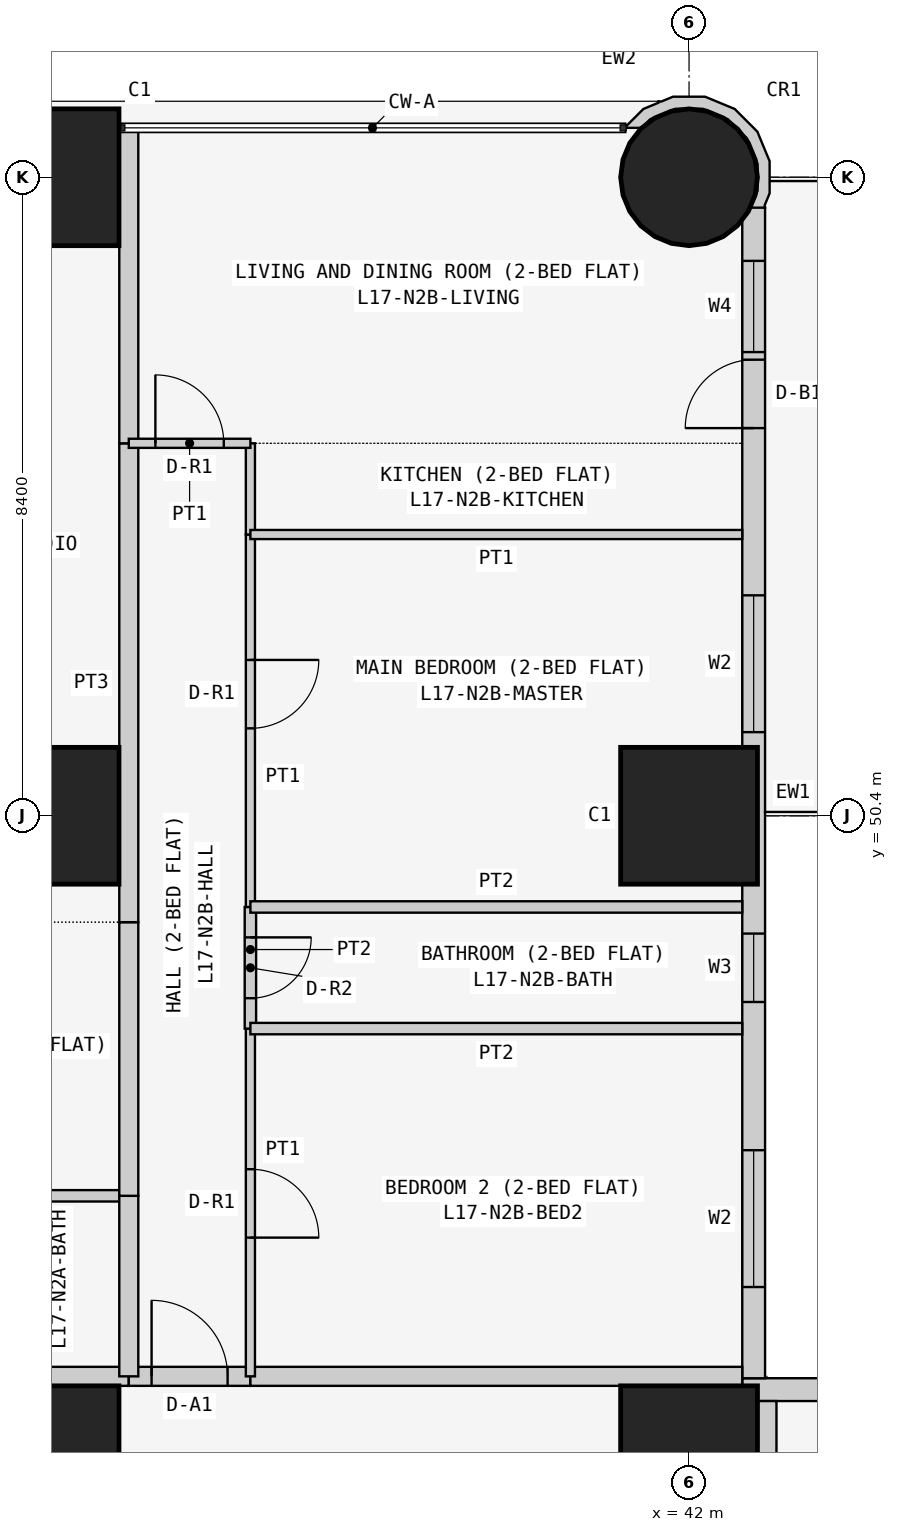
"""IFC4 building model, lengths in metres.
Left out: names, types, materials, properties, quantities, classifications, styles, units other than length and angle.
Written with IfcOpenShell. Run it as: python <this file> out.ifc"""

import sys

from ifc_helpers import new_model, si_unit, direction, frame, frame_2d, origin, origin_2d, place, context, subcontext, project, spatial, polyline, rectangle, circle, outline, extrude, element, fill, save


model = new_model("IFC4")
c1 = context("Model", 3, precision=1e-05, world=origin(), true_north=direction((0.0, 1.0)))
c2 = subcontext(c1, "Body", "Model", "MODEL_VIEW")
j1 = project(units=[si_unit("LENGTHUNIT", "METRE"), si_unit("PLANEANGLEUNIT", "RADIAN")], contexts=[c1])
p1 = place(None, origin())
s1 = spatial("IfcSite", under=j1, at=p1, CompositionType="ELEMENT")
p2 = place(p1, origin())
s2 = spatial("IfcBuilding", under=s1, at=p2, CompositionType="ELEMENT")
p3 = place(p2, frame((0.0, 0.0, 70.5)))
s3 = spatial("IfcBuildingStorey", under=s2, at=p3, CompositionType="ELEMENT", Elevation=70.5)
for number, where, z_axis, x_axis in (
    (1, (33.6, 42.0, 0.0), (0.0, 0.0, 1.0), (1.0, 0.0, 0.0)),
    (2, (33.6, 50.4, 0.0), (0.0, 0.0, 1.0), (1.0, 0.0, 0.0)),
    (3, (33.6, 58.8, 0.0), (0.0, 0.0, 1.0), (1.0, 0.0, 0.0)),
    (4, (42.0, 42.0, 0.0), (0.0, 0.0, 1.0), (1.0, 0.0, 0.0)),
    (5, (42.0, 50.4, 0.0), (0.0, 0.0, 1.0), (1.0, 0.0, 0.0)),
):
    element("IfcColumn", number, at=place(p3, frame(where, z_axis=z_axis, x_axis=x_axis)), inside=s3, PredefinedType="COLUMN", context=c2, shape_type="SweptSolid", body=[
        extrude(rectangle(XDim=1.8, YDim=1.8, at=origin_2d()), origin(), (0.0, 0.0, 1.0), 3.6),
    ])
p4 = place(p3, frame((42.0, 58.8, 0.0), z_axis=(0.0, 0.0, 1.0), x_axis=(1.0, 0.0, 0.0)))
e6 = element("IfcColumn", 6, at=p4, inside=s3, PredefinedType="COLUMN", context=c2, shape_type="SweptSolid", body=[
    extrude(circle(Radius=0.9, at=origin_2d()), origin(), (0.0, 0.0, 1.0), 3.6),
])
p5 = place(p3, frame((58.4, 42.85, 0.0), z_axis=(0.0, 0.0, 1.0), x_axis=(-1.0, 0.0, 0.0)))
e7 = element("IfcWall", 7, at=p5, inside=s3, PredefinedType="SOLIDWALL", context=c2, shape_type="SweptSolid", body=[
    extrude(rectangle(XDim=15.7, YDim=0.3, at=frame_2d((7.85, 0.0))), origin(), (0.0, 0.0, 1.0), 3.45),
])
p6 = place(p5, frame((12.4, 0.0, 0.9)))
e8 = element("IfcOpeningElement", 8, at=p6, cuts=e7, PredefinedType="OPENING", context=c2, shape_type="SweptSolid", body=[
    extrude(rectangle(XDim=1.8, YDim=1.5, at=frame_2d((0.9, 0.75))), frame((0.0, 0.16, 0.0), z_axis=(0.0, -1.0, 0.0), x_axis=(1.0, 0.0, 0.0)), (0.0, 0.0, 1.0), 0.32),
])
p7 = place(p5, frame((9.55, 0.0, 1.5)))
e9 = element("IfcOpeningElement", 9, at=p7, cuts=e7, PredefinedType="OPENING", context=c2, shape_type="SweptSolid", body=[
    extrude(rectangle(XDim=0.9, YDim=0.7, at=frame_2d((0.45, 0.35))), frame((0.0, 0.16, 0.0), z_axis=(0.0, -1.0, 0.0), x_axis=(1.0, 0.0, 0.0)), (0.0, 0.0, 1.0), 0.32),
])
p8 = place(p5, frame((5.1, 0.0, 0.9)))
e10 = element("IfcOpeningElement", 10, at=p8, cuts=e7, PredefinedType="OPENING", context=c2, shape_type="SweptSolid", body=[
    extrude(rectangle(XDim=1.8, YDim=1.5, at=frame_2d((0.9, 0.75))), frame((0.0, 0.16, 0.0), z_axis=(0.0, -1.0, 0.0), x_axis=(1.0, 0.0, 0.0)), (0.0, 0.0, 1.0), 0.32),
])
p9 = place(p5, frame((2.0, 0.0, 0.0)))
e11 = element("IfcOpeningElement", 11, at=p9, cuts=e7, PredefinedType="OPENING", context=c2, shape_type="SweptSolid", body=[
    extrude(rectangle(XDim=0.9, YDim=2.4, at=frame_2d((0.45, 1.2))), frame((0.0, 0.16, 0.0), z_axis=(0.0, -1.0, 0.0), x_axis=(1.0, 0.0, 0.0)), (0.0, 0.0, 1.0), 0.32),
])
p10 = place(p5, frame((0.7, 0.0, 0.9)))
e12 = element("IfcOpeningElement", 12, at=p10, cuts=e7, PredefinedType="OPENING", context=c2, shape_type="SweptSolid", body=[
    extrude(rectangle(XDim=1.2, YDim=1.5, at=frame_2d((0.6, 0.75))), frame((0.0, 0.16, 0.0), z_axis=(0.0, -1.0, 0.0), x_axis=(1.0, 0.0, 0.0)), (0.0, 0.0, 1.0), 0.32),
])
p11 = place(p3, frame((42.85, 43.0, 0.0), z_axis=(0.0, 0.0, 1.0), x_axis=(0.0, 1.0, 0.0)))
e13 = element("IfcWall", 13, at=p11, inside=s3, PredefinedType="SOLIDWALL", context=c2, shape_type="SweptSolid", body=[
    extrude(rectangle(XDim=15.4, YDim=0.3, at=frame_2d((7.7, 0.0))), origin(), (0.0, 0.0, 1.0), 3.45),
])
p12 = place(p11, frame((1.2, 0.0, 0.9)))
e14 = element("IfcOpeningElement", 14, at=p12, cuts=e13, PredefinedType="OPENING", context=c2, shape_type="SweptSolid", body=[
    extrude(rectangle(XDim=1.8, YDim=1.5, at=frame_2d((0.9, 0.75))), frame((0.0, 0.16, 0.0), z_axis=(0.0, -1.0, 0.0), x_axis=(1.0, 0.0, 0.0)), (0.0, 0.0, 1.0), 0.32),
])
p13 = place(p11, frame((4.95, 0.0, 1.5)))
e15 = element("IfcOpeningElement", 15, at=p13, cuts=e13, PredefinedType="OPENING", context=c2, shape_type="SweptSolid", body=[
    extrude(rectangle(XDim=0.9, YDim=0.7, at=frame_2d((0.45, 0.35))), frame((0.0, 0.16, 0.0), z_axis=(0.0, -1.0, 0.0), x_axis=(1.0, 0.0, 0.0)), (0.0, 0.0, 1.0), 0.32),
])
p14 = place(p11, frame((8.5, 0.0, 0.9)))
e16 = element("IfcOpeningElement", 16, at=p14, cuts=e13, PredefinedType="OPENING", context=c2, shape_type="SweptSolid", body=[
    extrude(rectangle(XDim=1.8, YDim=1.5, at=frame_2d((0.9, 0.75))), frame((0.0, 0.16, 0.0), z_axis=(0.0, -1.0, 0.0), x_axis=(1.0, 0.0, 0.0)), (0.0, 0.0, 1.0), 0.32),
])
p15 = place(p11, frame((12.5, 0.0, 0.0)))
e17 = element("IfcOpeningElement", 17, at=p15, cuts=e13, PredefinedType="OPENING", context=c2, shape_type="SweptSolid", body=[
    extrude(rectangle(XDim=0.9, YDim=2.4, at=frame_2d((0.45, 1.2))), frame((0.0, 0.16, 0.0), z_axis=(0.0, -1.0, 0.0), x_axis=(1.0, 0.0, 0.0)), (0.0, 0.0, 1.0), 0.32),
])
p16 = place(p11, frame((13.5, 0.0, 0.9)))
e18 = element("IfcOpeningElement", 18, at=p16, cuts=e13, PredefinedType="OPENING", context=c2, shape_type="SweptSolid", body=[
    extrude(rectangle(XDim=1.2, YDim=1.5, at=frame_2d((0.6, 0.75))), frame((0.0, 0.16, 0.0), z_axis=(0.0, -1.0, 0.0), x_axis=(1.0, 0.0, 0.0)), (0.0, 0.0, 1.0), 0.32),
])
p17 = place(p3, frame((42.91, 58.436, 0.0), z_axis=(0.0, 0.0, 1.0), x_axis=(0.377204953059, 0.926129809145, 0.0)))
e19 = element("IfcWall", 19, at=p17, inside=s3, PredefinedType="SOLIDWALL", context=c2, shape_type="SweptSolid", body=[
    extrude(outline(polyline([(0.769, 1.728), (0.75, 1.723), (0.6, 1.875), (0.295, 2.004), (0.281, 1.998), (0.36, 1.803), (0.509, 1.741), (0.761, 1.486), (0.896, 1.154), (0.894, 0.795), (0.755, 0.465), (0.5, 0.213), (0.168, 0.078), (-0.1, 0.08), (0.001, -0.097), (0.03, -0.08), (0.198, -0.081), (0.589, 0.078), (0.889, 0.374), (1.052, 0.763), (1.055, 1.185), (0.896, 1.575), (0.778, 1.695), (0.769, 1.728)])), origin(), (0.0, 0.0, 1.0), 3.45),
])
p18 = place(p3, frame((32.0, 43.025, 0.0), z_axis=(0.0, 0.0, 1.0), x_axis=(1.0, 0.0, 0.0)))
e20 = element("IfcWall", 20, at=p18, inside=s3, PredefinedType="PARTITIONING", context=c2, shape_type="SweptSolid", body=[
    extrude(rectangle(XDim=2.629, YDim=0.25, at=frame_2d((1.314, 0.0))), origin(), (0.0, 0.0, 1.0), 3.45),
])
p19 = place(p3, frame((34.629, 43.025, 0.0), z_axis=(0.0, 0.0, 1.0), x_axis=(1.0, 0.0, 0.0)))
e21 = element("IfcWall", 21, at=p19, inside=s3, PredefinedType="PARTITIONING", context=c2, shape_type="SweptSolid", body=[
    extrude(rectangle(XDim=1.6, YDim=0.25, at=frame_2d((0.8, 0.0))), origin(), (0.0, 0.0, 1.0), 3.45),
])
p20 = place(p19, frame((0.3, 0.0, 0.0)))
e22 = element("IfcOpeningElement", 22, at=p20, cuts=e21, PredefinedType="OPENING", context=c2, shape_type="SweptSolid", body=[
    extrude(rectangle(XDim=1.0, YDim=2.1, at=frame_2d((0.5, 1.05))), frame((0.0, 0.135, 0.0), z_axis=(0.0, -1.0, 0.0), x_axis=(1.0, 0.0, 0.0)), (0.0, 0.0, 1.0), 0.27),
])
p21 = place(p3, frame((36.229, 43.025, 0.0), z_axis=(0.0, 0.0, 1.0), x_axis=(1.0, 0.0, 0.0)))
e23 = element("IfcWall", 23, at=p21, inside=s3, PredefinedType="PARTITIONING", context=c2, shape_type="SweptSolid", body=[
    extrude(rectangle(XDim=6.471, YDim=0.25, at=frame_2d((3.235, 0.0))), origin(), (0.0, 0.0, 1.0), 3.45),
])
p22 = place(p3, frame((43.025, 42.7, 0.0), z_axis=(0.0, 0.0, 1.0), x_axis=(0.0, -1.0, 0.0)))
e24 = element("IfcWall", 24, at=p22, inside=s3, PredefinedType="PARTITIONING", context=c2, shape_type="SweptSolid", body=[
    extrude(rectangle(XDim=6.871, YDim=0.25, at=frame_2d((3.436, 0.0))), origin(), (0.0, 0.0, 1.0), 3.45),
])
p23 = place(p3, frame((32.0, 45.4, 0.0), z_axis=(0.0, 0.0, 1.0), x_axis=(1.0, 0.0, 0.0)))
e25 = element("IfcWall", 25, at=p23, inside=s3, PredefinedType="PARTITIONING", context=c2, shape_type="SweptSolid", body=[
    extrude(rectangle(XDim=2.629, YDim=0.15, at=frame_2d((1.314, 0.0))), origin(), (0.0, 0.0, 1.0), 3.45),
])
p24 = place(p3, frame((34.629, 45.4, 0.0), z_axis=(0.0, 0.0, 1.0), x_axis=(0.0, -1.0, 0.0)))
e26 = element("IfcWall", 26, at=p24, inside=s3, PredefinedType="PARTITIONING", context=c2, shape_type="SweptSolid", body=[
    extrude(rectangle(XDim=2.375, YDim=0.25, at=frame_2d((1.188, 0.0))), origin(), (0.0, 0.0, 1.0), 3.45),
])
p25 = place(p3, frame((34.629, 49.0, 0.0), z_axis=(0.0, 0.0, 1.0), x_axis=(0.0, -1.0, 0.0)))
e27 = element("IfcWall", 27, at=p25, inside=s3, PredefinedType="PARTITIONING", context=c2, shape_type="SweptSolid", body=[
    extrude(rectangle(XDim=3.6, YDim=0.25, at=frame_2d((1.8, 0.0))), origin(), (0.0, 0.0, 1.0), 3.45),
])
p26 = place(p3, frame((34.629, 55.3, 0.0), z_axis=(0.0, 0.0, 1.0), x_axis=(0.0, -1.0, 0.0)))
e28 = element("IfcWall", 28, at=p26, inside=s3, PredefinedType="PARTITIONING", context=c2, shape_type="SweptSolid", body=[
    extrude(rectangle(XDim=6.3, YDim=0.25, at=frame_2d((3.15, 0.0))), origin(), (0.0, 0.0, 1.0), 3.45),
])
p27 = place(p3, frame((34.629, 59.45, 0.0), z_axis=(0.0, 0.0, 1.0), x_axis=(0.0, -1.0, 0.0)))
e29 = element("IfcWall", 29, at=p27, inside=s3, PredefinedType="PARTITIONING", context=c2, shape_type="SweptSolid", body=[
    extrude(rectangle(XDim=4.15, YDim=0.25, at=frame_2d((2.075, 0.0))), origin(), (0.0, 0.0, 1.0), 3.45),
])
p28 = place(p3, frame((36.229, 47.6, 0.0), z_axis=(0.0, 0.0, 1.0), x_axis=(0.0, -1.0, 0.0)))
e30 = element("IfcWall", 30, at=p28, inside=s3, PredefinedType="PARTITIONING", context=c2, shape_type="SweptSolid", body=[
    extrude(rectangle(XDim=4.575, YDim=0.12, at=frame_2d((2.288, 0.0))), origin(), (0.0, 0.0, 1.0), 3.45),
])
p29 = place(p28, frame((1.85, 0.0, 0.0)))
e31 = element("IfcOpeningElement", 31, at=p29, cuts=e30, PredefinedType="OPENING", context=c2, shape_type="SweptSolid", body=[
    extrude(rectangle(XDim=0.9, YDim=2.1, at=frame_2d((0.45, 1.05))), frame((0.0, 0.07, 0.0), z_axis=(0.0, -1.0, 0.0), x_axis=(1.0, 0.0, 0.0)), (0.0, 0.0, 1.0), 0.14),
])
p30 = place(p3, frame((36.229, 49.2, 0.0), z_axis=(0.0, 0.0, 1.0), x_axis=(0.0, -1.0, 0.0)))
e32 = element("IfcWall", 32, at=p30, inside=s3, PredefinedType="PARTITIONING", context=c2, shape_type="SweptSolid", body=[
    extrude(rectangle(XDim=1.6, YDim=0.15, at=frame_2d((0.8, 0.0))), origin(), (0.0, 0.0, 1.0), 3.45),
])
p31 = place(p30, frame((0.4, 0.0, 0.0)))
e33 = element("IfcOpeningElement", 33, at=p31, cuts=e32, PredefinedType="OPENING", context=c2, shape_type="SweptSolid", body=[
    extrude(rectangle(XDim=0.8, YDim=2.1, at=frame_2d((0.4, 1.05))), frame((0.0, 0.085, 0.0), z_axis=(0.0, -1.0, 0.0), x_axis=(1.0, 0.0, 0.0)), (0.0, 0.0, 1.0), 0.17),
])
p32 = place(p3, frame((36.229, 54.1, 0.0), z_axis=(0.0, 0.0, 1.0), x_axis=(0.0, -1.0, 0.0)))
e34 = element("IfcWall", 34, at=p32, inside=s3, PredefinedType="PARTITIONING", context=c2, shape_type="SweptSolid", body=[
    extrude(rectangle(XDim=4.9, YDim=0.12, at=frame_2d((2.45, 0.0))), origin(), (0.0, 0.0, 1.0), 3.45),
])
p33 = place(p32, frame((1.65, 0.0, 0.0)))
e35 = element("IfcOpeningElement", 35, at=p33, cuts=e34, PredefinedType="OPENING", context=c2, shape_type="SweptSolid", body=[
    extrude(rectangle(XDim=0.9, YDim=2.1, at=frame_2d((0.45, 1.05))), frame((0.0, 0.07, 0.0), z_axis=(0.0, -1.0, 0.0), x_axis=(1.0, 0.0, 0.0)), (0.0, 0.0, 1.0), 0.14),
])
p34 = place(p3, frame((36.229, 55.3, 0.0), z_axis=(0.0, 0.0, 1.0), x_axis=(0.0, -1.0, 0.0)))
e36 = element("IfcWall", 36, at=p34, inside=s3, PredefinedType="PARTITIONING", context=c2, shape_type="SweptSolid", body=[
    extrude(rectangle(XDim=1.2, YDim=0.12, at=frame_2d((0.6, 0.0))), origin(), (0.0, 0.0, 1.0), 3.45),
])
p35 = place(p3, frame((34.629, 55.3, 0.0), z_axis=(0.0, 0.0, 1.0), x_axis=(1.0, 0.0, 0.0)))
e37 = element("IfcWall", 37, at=p35, inside=s3, PredefinedType="PARTITIONING", context=c2, shape_type="SweptSolid", body=[
    extrude(rectangle(XDim=1.6, YDim=0.12, at=frame_2d((0.8, 0.0))), origin(), (0.0, 0.0, 1.0), 3.45),
])
p36 = place(p35, frame((0.35, 0.0, 0.0)))
e38 = element("IfcOpeningElement", 38, at=p36, cuts=e37, PredefinedType="OPENING", context=c2, shape_type="SweptSolid", body=[
    extrude(rectangle(XDim=0.9, YDim=2.1, at=frame_2d((0.45, 1.05))), frame((0.0, 0.07, 0.0), z_axis=(0.0, -1.0, 0.0), x_axis=(1.0, 0.0, 0.0)), (0.0, 0.0, 1.0), 0.14),
])
for number, where, z_axis, x_axis in (
    (39, (36.229, 47.6, 0.0), (0.0, 0.0, 1.0), (1.0, 0.0, 0.0)),
    (40, (36.229, 49.2, 0.0), (0.0, 0.0, 1.0), (1.0, 0.0, 0.0)),
):
    element("IfcWall", number, at=place(p3, frame(where, z_axis=z_axis, x_axis=x_axis)), inside=s3, PredefinedType="PARTITIONING", context=c2, shape_type="SweptSolid", body=[
        extrude(rectangle(XDim=6.471, YDim=0.15, at=frame_2d((3.235, 0.0))), origin(), (0.0, 0.0, 1.0), 3.45),
    ])
p37 = place(p3, frame((36.229, 54.1, 0.0), z_axis=(0.0, 0.0, 1.0), x_axis=(1.0, 0.0, 0.0)))
e41 = element("IfcWall", 41, at=p37, inside=s3, PredefinedType="PARTITIONING", context=c2, shape_type="SweptSolid", body=[
    extrude(rectangle(XDim=6.471, YDim=0.12, at=frame_2d((3.235, 0.0))), origin(), (0.0, 0.0, 1.0), 3.45),
])
p38 = place(p12, origin())
e42 = element("IfcWindow", 42, at=p38, inside=s3, PartitioningType="SINGLE_PANEL", PredefinedType="WINDOW", context=c2, shape_type="SweptSolid", body=[
    extrude(rectangle(XDim=1.8, YDim=1.5, at=frame_2d((0.9, 0.75))), frame((0.0, 0.03, 0.0), z_axis=(0.0, -1.0, 0.0), x_axis=(1.0, 0.0, 0.0)), (0.0, 0.0, 1.0), 0.06),
])
fill(e14, e42)
p39 = place(p13, origin())
e43 = element("IfcWindow", 43, at=p39, inside=s3, PartitioningType="SINGLE_PANEL", PredefinedType="WINDOW", context=c2, shape_type="SweptSolid", body=[
    extrude(rectangle(XDim=0.9, YDim=0.7, at=frame_2d((0.45, 0.35))), frame((0.0, 0.03, 0.0), z_axis=(0.0, -1.0, 0.0), x_axis=(1.0, 0.0, 0.0)), (0.0, 0.0, 1.0), 0.06),
])
fill(e15, e43)
p40 = place(p14, origin())
e44 = element("IfcWindow", 44, at=p40, inside=s3, PartitioningType="SINGLE_PANEL", PredefinedType="WINDOW", context=c2, shape_type="SweptSolid", body=[
    extrude(rectangle(XDim=1.8, YDim=1.5, at=frame_2d((0.9, 0.75))), frame((0.0, 0.03, 0.0), z_axis=(0.0, -1.0, 0.0), x_axis=(1.0, 0.0, 0.0)), (0.0, 0.0, 1.0), 0.06),
])
fill(e16, e44)
p41 = place(p15, origin())
e45 = element("IfcDoor", 45, at=p41, inside=s3, OperationType="SINGLE_SWING_LEFT", PredefinedType="DOOR", context=c2, shape_type="SweptSolid", body=[
    extrude(rectangle(XDim=0.9, YDim=2.4, at=frame_2d((0.45, 1.2))), frame((0.0, 0.025, 0.0), z_axis=(0.0, -1.0, 0.0), x_axis=(1.0, 0.0, 0.0)), (0.0, 0.0, 1.0), 0.05),
])
fill(e17, e45)
p42 = place(p16, origin())
e46 = element("IfcWindow", 46, at=p42, inside=s3, PartitioningType="SINGLE_PANEL", PredefinedType="WINDOW", context=c2, shape_type="SweptSolid", body=[
    extrude(rectangle(XDim=1.2, YDim=1.5, at=frame_2d((0.6, 0.75))), frame((0.0, 0.03, 0.0), z_axis=(0.0, -1.0, 0.0), x_axis=(1.0, 0.0, 0.0)), (0.0, 0.0, 1.0), 0.06),
])
fill(e18, e46)
p43 = place(p20, origin())
e47 = element("IfcDoor", 47, at=p43, inside=s3, OperationType="SINGLE_SWING_LEFT", PredefinedType="DOOR", context=c2, shape_type="SweptSolid", body=[
    extrude(rectangle(XDim=1.0, YDim=2.1, at=frame_2d((0.5, 1.05))), frame((0.0, 0.025, 0.0), z_axis=(0.0, -1.0, 0.0), x_axis=(1.0, 0.0, 0.0)), (0.0, 0.0, 1.0), 0.05),
])
fill(e22, e47)
p44 = place(p29, origin())
e48 = element("IfcDoor", 48, at=p44, inside=s3, OperationType="SINGLE_SWING_RIGHT", PredefinedType="DOOR", context=c2, shape_type="SweptSolid", body=[
    extrude(rectangle(XDim=0.9, YDim=2.1, at=frame_2d((0.45, 1.05))), frame((0.0, 0.025, 0.0), z_axis=(0.0, -1.0, 0.0), x_axis=(1.0, 0.0, 0.0)), (0.0, 0.0, 1.0), 0.05),
])
fill(e31, e48)
p45 = place(p31, origin())
e49 = element("IfcDoor", 49, at=p45, inside=s3, OperationType="SINGLE_SWING_LEFT", PredefinedType="DOOR", context=c2, shape_type="SweptSolid", body=[
    extrude(rectangle(XDim=0.8, YDim=2.1, at=frame_2d((0.4, 1.05))), frame((0.0, 0.025, 0.0), z_axis=(0.0, -1.0, 0.0), x_axis=(1.0, 0.0, 0.0)), (0.0, 0.0, 1.0), 0.05),
])
fill(e33, e49)
p46 = place(p33, origin())
e50 = element("IfcDoor", 50, at=p46, inside=s3, OperationType="SINGLE_SWING_LEFT", PredefinedType="DOOR", context=c2, shape_type="SweptSolid", body=[
    extrude(rectangle(XDim=0.9, YDim=2.1, at=frame_2d((0.45, 1.05))), frame((0.0, 0.025, 0.0), z_axis=(0.0, -1.0, 0.0), x_axis=(1.0, 0.0, 0.0)), (0.0, 0.0, 1.0), 0.05),
])
fill(e35, e50)
p47 = place(p36, origin())
e51 = element("IfcDoor", 51, at=p47, inside=s3, OperationType="SINGLE_SWING_LEFT", PredefinedType="DOOR", context=c2, shape_type="SweptSolid", body=[
    extrude(rectangle(XDim=0.9, YDim=2.1, at=frame_2d((0.45, 1.05))), frame((0.0, 0.025, 0.0), z_axis=(0.0, -1.0, 0.0), x_axis=(1.0, 0.0, 0.0)), (0.0, 0.0, 1.0), 0.05),
])
fill(e38, e51)
save(model, sys.argv[1])
